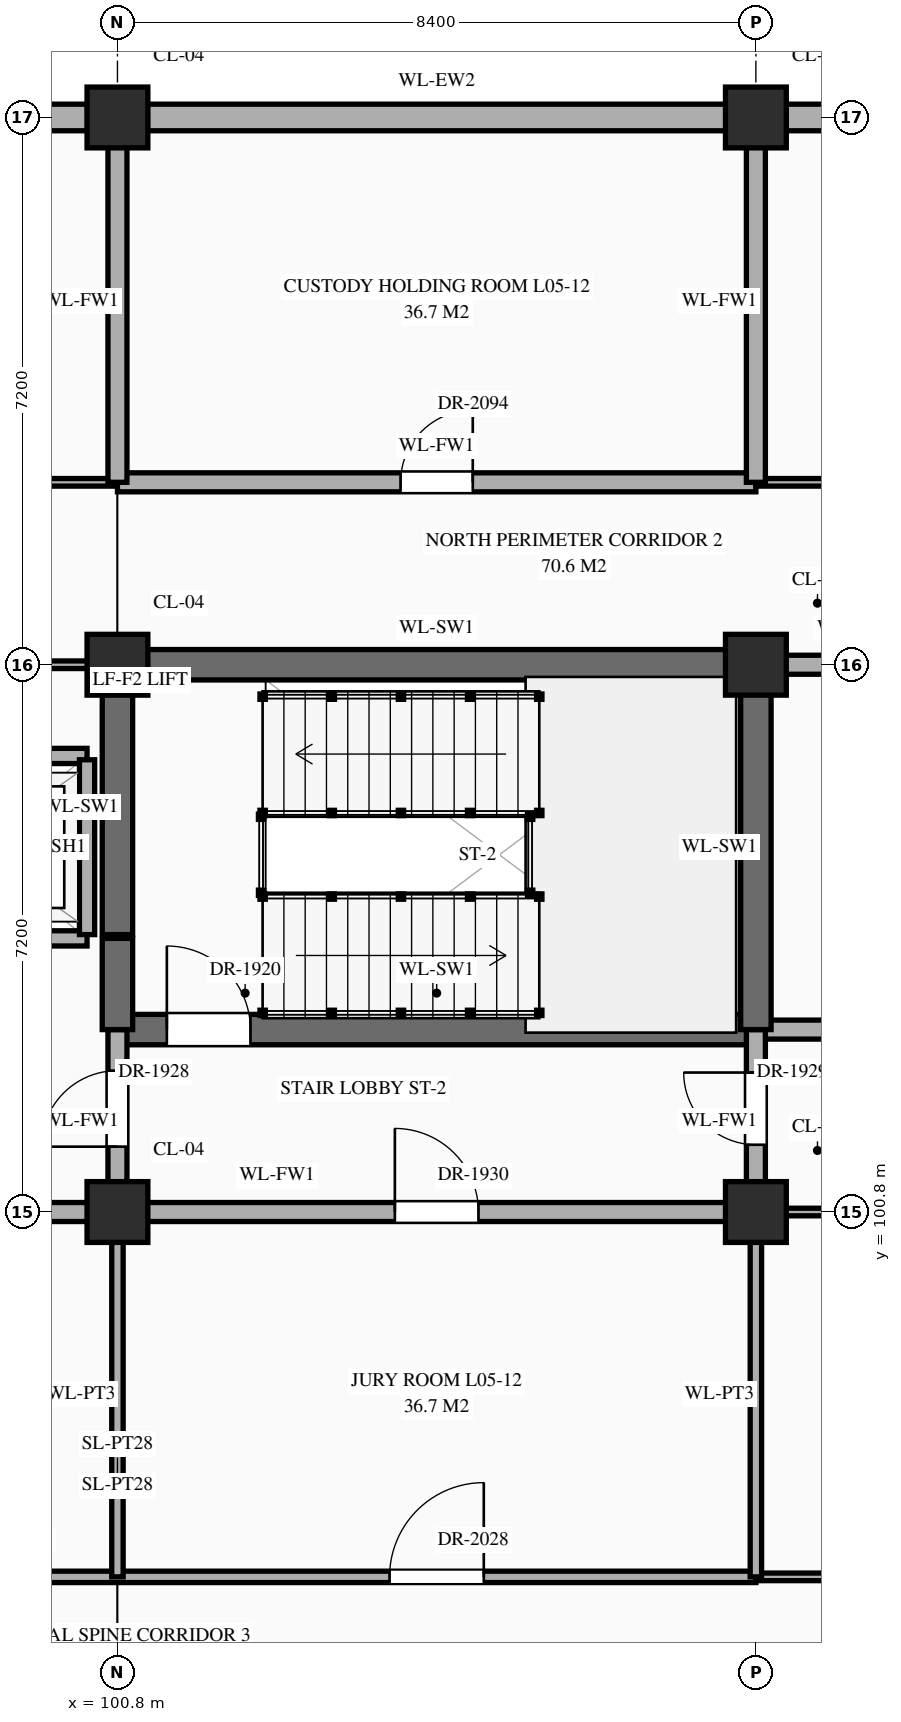
"""IFC4 building model, lengths in metres.
Left out: names, types, materials, properties, quantities, classifications, styles, units other than length and angle.
Written with IfcOpenShell. Run it as: python <this file> out.ifc"""

import sys

from ifc_helpers import new_model, si_unit, direction, frame, frame_2d, origin, origin_2d, place, context, subcontext, project, spatial, rectangle, extrude, element, fill, save


model = new_model("IFC4")
c1 = context("Model", 3, precision=1e-05, world=origin(), true_north=direction((0.0, 1.0)))
c2 = subcontext(c1, "Body", "Model", "MODEL_VIEW")
j1 = project(units=[si_unit("LENGTHUNIT", "METRE"), si_unit("PLANEANGLEUNIT", "RADIAN")], contexts=[c1])
p1 = place(None, origin())
s1 = spatial("IfcSite", under=j1, at=p1, CompositionType="ELEMENT")
p2 = place(p1, origin())
s2 = spatial("IfcBuilding", under=s1, at=p2, CompositionType="ELEMENT")
p3 = place(p2, frame((0.0, 0.0, 21.6)))
s3 = spatial("IfcBuildingStorey", under=s2, at=p3, CompositionType="ELEMENT", Elevation=21.6)
for number, where, z_axis, x_axis in (
    (1, (100.8, 100.8, 0.0), (0.0, 0.0, 1.0), (1.0, 0.0, 0.0)),
    (2, (100.8, 108.0, 0.0), (0.0, 0.0, 1.0), (1.0, 0.0, 0.0)),
    (3, (100.8, 115.2, 0.0), (0.0, 0.0, 1.0), (1.0, 0.0, 0.0)),
    (4, (109.2, 100.8, 0.0), (0.0, 0.0, 1.0), (1.0, 0.0, 0.0)),
    (5, (109.2, 108.0, 0.0), (0.0, 0.0, 1.0), (1.0, 0.0, 0.0)),
    (6, (109.2, 115.2, 0.0), (0.0, 0.0, 1.0), (1.0, 0.0, 0.0)),
):
    element("IfcColumn", number, at=place(p3, frame(where, z_axis=z_axis, x_axis=x_axis)), inside=s3, PredefinedType="COLUMN", context=c2, shape_type="SweptSolid", body=[
        extrude(rectangle(XDim=0.8, YDim=0.8, at=origin_2d()), origin(), (0.0, 0.0, 1.0), 4.5),
    ])
p4 = place(p3, frame((92.795, 115.2, 0.0), z_axis=(0.0, 0.0, 1.0), x_axis=(1.0, 0.0, 0.0)))
e7 = element("IfcWall", 7, at=p4, inside=s3, PredefinedType="STANDARD", context=c2, shape_type="SweptSolid", body=[
    extrude(rectangle(XDim=7.61, YDim=0.35, at=frame_2d((3.805, 0.0))), origin(), (0.0, 0.0, 1.0), 3.59),
])
p5 = place(p4, frame((3.28, 0.0, 0.85)))
e8 = element("IfcOpeningElement", 8, at=p5, cuts=e7, PredefinedType="OPENING", context=c2, shape_type="SweptSolid", body=[
    extrude(rectangle(XDim=1.05, YDim=1.38, at=frame_2d((0.525, 0.69))), frame((0.0, 0.187, 0.0), z_axis=(0.0, -1.0, 0.0), x_axis=(1.0, 0.0, 0.0)), (0.0, 0.0, 1.0), 0.374),
])
p6 = place(p3, frame((101.195, 115.2, 0.0), z_axis=(0.0, 0.0, 1.0), x_axis=(1.0, 0.0, 0.0)))
e9 = element("IfcWall", 9, at=p6, inside=s3, PredefinedType="STANDARD", context=c2, shape_type="SweptSolid", body=[
    extrude(rectangle(XDim=7.61, YDim=0.35, at=frame_2d((3.805, 0.0))), origin(), (0.0, 0.0, 1.0), 3.59),
])
p7 = place(p3, frame((109.595, 115.2, 0.0), z_axis=(0.0, 0.0, 1.0), x_axis=(1.0, 0.0, 0.0)))
e10 = element("IfcWall", 10, at=p7, inside=s3, PredefinedType="STANDARD", context=c2, shape_type="SweptSolid", body=[
    extrude(rectangle(XDim=7.61, YDim=0.35, at=frame_2d((3.805, 0.0))), origin(), (0.0, 0.0, 1.0), 3.59),
])
p8 = place(p7, frame((3.28, 0.0, 0.85)))
e11 = element("IfcOpeningElement", 11, at=p8, cuts=e10, PredefinedType="OPENING", context=c2, shape_type="SweptSolid", body=[
    extrude(rectangle(XDim=1.05, YDim=1.74, at=frame_2d((0.525, 0.87))), frame((0.0, 0.187, 0.0), z_axis=(0.0, -1.0, 0.0), x_axis=(1.0, 0.0, 0.0)), (0.0, 0.0, 1.0), 0.374),
])
p9 = place(p3, frame((89.8, 96.0, 0.0), z_axis=(0.0, 0.0, 1.0), x_axis=(1.0, 0.0, 0.0)))
e12 = element("IfcWall", 12, at=p9, inside=s3, PredefinedType="STANDARD", context=c2, shape_type="SweptSolid", body=[
    extrude(rectangle(XDim=19.4, YDim=0.15, at=frame_2d((9.7, 0.0))), origin(), (0.0, 0.0, 1.0), 4.24),
])
p10 = place(p9, frame((0.72, 0.0, 0.0)))
e13 = element("IfcOpeningElement", 13, at=p10, cuts=e12, PredefinedType="OPENING", context=c2, shape_type="SweptSolid", body=[
    extrude(rectangle(XDim=1.16, YDim=2.3, at=frame_2d((0.58, 1.15))), frame((0.0, 0.087, 0.0), z_axis=(0.0, -1.0, 0.0), x_axis=(1.0, 0.0, 0.0)), (0.0, 0.0, 1.0), 0.174),
])
p11 = place(p9, frame((6.2, 0.0, 0.0)))
e14 = element("IfcOpeningElement", 14, at=p11, cuts=e12, PredefinedType="OPENING", context=c2, shape_type="SweptSolid", body=[
    extrude(rectangle(XDim=1.2, YDim=2.35, at=frame_2d((0.6, 1.175))), frame((0.0, 0.087, 0.0), z_axis=(0.0, -1.0, 0.0), x_axis=(1.0, 0.0, 0.0)), (0.0, 0.0, 1.0), 0.174),
])
p12 = place(p9, frame((14.58, 0.0, 0.0)))
e15 = element("IfcOpeningElement", 15, at=p12, cuts=e12, PredefinedType="OPENING", context=c2, shape_type="SweptSolid", body=[
    extrude(rectangle(XDim=1.24, YDim=2.3, at=frame_2d((0.62, 1.15))), frame((0.0, 0.087, 0.0), z_axis=(0.0, -1.0, 0.0), x_axis=(1.0, 0.0, 0.0)), (0.0, 0.0, 1.0), 0.174),
])
p13 = place(p3, frame((109.2, 96.0, 0.0), z_axis=(0.0, 0.0, 1.0), x_axis=(1.0, 0.0, 0.0)))
e16 = element("IfcWall", 16, at=p13, inside=s3, PredefinedType="STANDARD", context=c2, shape_type="SweptSolid", body=[
    extrude(rectangle(XDim=5.8, YDim=0.1, at=frame_2d((2.9, 0.0))), origin(), (0.0, 0.0, 1.0), 4.24),
])
p14 = place(p13, frame((1.06, 0.0, 0.0)))
e17 = element("IfcOpeningElement", 17, at=p14, cuts=e16, PredefinedType="OPENING", context=c2, shape_type="SweptSolid", body=[
    extrude(rectangle(XDim=1.28, YDim=2.35, at=frame_2d((0.64, 1.175))), frame((0.0, 0.062, 0.0), z_axis=(0.0, -1.0, 0.0), x_axis=(1.0, 0.0, 0.0)), (0.0, 0.0, 1.0), 0.124),
])
p15 = place(p13, frame((4.13, 0.0, 0.0)))
e18 = element("IfcOpeningElement", 18, at=p15, cuts=e16, PredefinedType="OPENING", context=c2, shape_type="SweptSolid", body=[
    extrude(rectangle(XDim=0.94, YDim=2.3, at=frame_2d((0.47, 1.15))), frame((0.0, 0.062, 0.0), z_axis=(0.0, -1.0, 0.0), x_axis=(1.0, 0.0, 0.0)), (0.0, 0.0, 1.0), 0.124),
])
p16 = place(p3, frame((96.6, 100.8, 0.0), z_axis=(0.0, 0.0, 1.0), x_axis=(1.0, 0.0, 0.0)))
e19 = element("IfcWall", 19, at=p16, inside=s3, PredefinedType="STANDARD", context=c2, shape_type="SweptSolid", body=[
    extrude(rectangle(XDim=12.6, YDim=0.25, at=frame_2d((6.3, 0.0))), origin(), (0.0, 0.0, 1.0), 3.39),
])
p17 = place(p16, frame((7.85, 0.0, 0.0)))
e20 = element("IfcOpeningElement", 20, at=p17, cuts=e19, PredefinedType="OPENING", context=c2, shape_type="SweptSolid", body=[
    extrude(rectangle(XDim=1.1, YDim=2.2, at=frame_2d((0.55, 1.1))), frame((0.0, 0.137, 0.0), z_axis=(0.0, -1.0, 0.0), x_axis=(1.0, 0.0, 0.0)), (0.0, 0.0, 1.0), 0.274),
])
p18 = place(p3, frame((109.2, 100.8, 0.0), z_axis=(0.0, 0.0, 1.0), x_axis=(1.0, 0.0, 0.0)))
e21 = element("IfcWall", 21, at=p18, inside=s3, PredefinedType="STANDARD", context=c2, shape_type="SweptSolid", body=[
    extrude(rectangle(XDim=3.4, YDim=0.1, at=frame_2d((1.7, 0.0))), origin(), (0.0, 0.0, 1.0), 3.39),
])
p19 = place(p18, frame((1.33, 0.0, 0.0)))
e22 = element("IfcOpeningElement", 22, at=p19, cuts=e21, PredefinedType="OPENING", context=c2, shape_type="SweptSolid", body=[
    extrude(rectangle(XDim=1.06, YDim=2.4, at=frame_2d((0.53, 1.2))), frame((0.0, 0.062, 0.0), z_axis=(0.0, -1.0, 0.0), x_axis=(1.0, 0.0, 0.0)), (0.0, 0.0, 1.0), 0.124),
])
p20 = place(p3, frame((100.8, 103.2, 0.0), z_axis=(0.0, 0.0, 1.0), x_axis=(1.0, 0.0, 0.0)))
e23 = element("IfcWall", 23, at=p20, inside=s3, PredefinedType="SHEAR", context=c2, shape_type="SweptSolid", body=[
    extrude(rectangle(XDim=8.4, YDim=0.4, at=frame_2d((4.2, 0.0))), origin(), (0.0, 0.0, 1.0), 4.24),
])
p21 = place(p20, frame((0.65, 0.0, 0.0)))
e24 = element("IfcOpeningElement", 24, at=p21, cuts=e23, PredefinedType="OPENING", context=c2, shape_type="SweptSolid", body=[
    extrude(rectangle(XDim=1.1, YDim=2.2, at=frame_2d((0.55, 1.1))), frame((0.0, 0.212, 0.0), z_axis=(0.0, -1.0, 0.0), x_axis=(1.0, 0.0, 0.0)), (0.0, 0.0, 1.0), 0.424),
])
p22 = place(p3, frame((109.2, 103.2, 0.0), z_axis=(0.0, 0.0, 1.0), x_axis=(1.0, 0.0, 0.0)))
e25 = element("IfcWall", 25, at=p22, inside=s3, PredefinedType="STANDARD", context=c2, shape_type="SweptSolid", body=[
    extrude(rectangle(XDim=4.2, YDim=0.25, at=frame_2d((2.1, 0.0))), origin(), (0.0, 0.0, 1.0), 4.24),
])
p23 = place(p22, frame((1.625, 0.0, 0.0)))
e26 = element("IfcOpeningElement", 26, at=p23, cuts=e25, PredefinedType="OPENING", context=c2, shape_type="SweptSolid", body=[
    extrude(rectangle(XDim=0.95, YDim=2.15, at=frame_2d((0.475, 1.075))), frame((0.0, 0.137, 0.0), z_axis=(0.0, -1.0, 0.0), x_axis=(1.0, 0.0, 0.0)), (0.0, 0.0, 1.0), 0.274),
])
p24 = place(p3, frame((97.4, 104.4, 0.0), z_axis=(0.0, 0.0, 1.0), x_axis=(1.0, 0.0, 0.0)))
e27 = element("IfcWall", 27, at=p24, inside=s3, PredefinedType="STANDARD", context=c2, shape_type="SweptSolid", body=[
    extrude(rectangle(XDim=3.0, YDim=0.2, at=frame_2d((1.5, 0.0))), origin(), (0.0, 0.0, 1.0), 4.24),
])
p25 = place(p24, frame((0.9, 0.0, 0.0)))
e28 = element("IfcOpeningElement", 28, at=p25, cuts=e27, PredefinedType="OPENING", context=c2, shape_type="SweptSolid", body=[
    extrude(rectangle(XDim=1.2, YDim=2.15, at=frame_2d((0.6, 1.075))), frame((0.0, 0.112, 0.0), z_axis=(0.0, -1.0, 0.0), x_axis=(1.0, 0.0, 0.0)), (0.0, 0.0, 1.0), 0.224),
])
p26 = place(p3, frame((97.4, 106.8, 0.0), z_axis=(0.0, 0.0, 1.0), x_axis=(1.0, 0.0, 0.0)))
e29 = element("IfcWall", 29, at=p26, inside=s3, PredefinedType="STANDARD", context=c2, shape_type="SweptSolid", body=[
    extrude(rectangle(XDim=3.0, YDim=0.2, at=frame_2d((1.5, 0.0))), origin(), (0.0, 0.0, 1.0), 4.24),
])
p27 = place(p3, frame((96.65, 108.0, 0.0), z_axis=(0.0, 0.0, 1.0), x_axis=(1.0, 0.0, 0.0)))
e30 = element("IfcWall", 30, at=p27, inside=s3, PredefinedType="STANDARD", context=c2, shape_type="SweptSolid", body=[
    extrude(rectangle(XDim=4.1, YDim=0.1, at=frame_2d((2.05, 0.0))), origin(), (0.0, 0.0, 1.0), 3.39),
])
p28 = place(p3, frame((100.8, 108.0, 0.0), z_axis=(0.0, 0.0, 1.0), x_axis=(1.0, 0.0, 0.0)))
e31 = element("IfcWall", 31, at=p28, inside=s3, PredefinedType="SHEAR", context=c2, shape_type="SweptSolid", body=[
    extrude(rectangle(XDim=8.4, YDim=0.4, at=frame_2d((4.2, 0.0))), origin(), (0.0, 0.0, 1.0), 4.24),
])
p29 = place(p3, frame((109.2, 108.0, 0.0), z_axis=(0.0, 0.0, 1.0), x_axis=(1.0, 0.0, 0.0)))
e32 = element("IfcWall", 32, at=p29, inside=s3, PredefinedType="STANDARD", context=c2, shape_type="SweptSolid", body=[
    extrude(rectangle(XDim=4.2, YDim=0.25, at=frame_2d((2.1, 0.0))), origin(), (0.0, 0.0, 1.0), 3.39),
])
p30 = place(p29, frame((1.785, 0.0, 0.0)))
e33 = element("IfcOpeningElement", 33, at=p30, cuts=e32, PredefinedType="OPENING", context=c2, shape_type="SweptSolid", body=[
    extrude(rectangle(XDim=0.95, YDim=2.15, at=frame_2d((0.475, 1.075))), frame((0.0, 0.137, 0.0), z_axis=(0.0, -1.0, 0.0), x_axis=(1.0, 0.0, 0.0)), (0.0, 0.0, 1.0), 0.274),
])
p31 = place(p3, frame((67.2, 110.4, 0.0), z_axis=(0.0, 0.0, 1.0), x_axis=(1.0, 0.0, 0.0)))
e34 = element("IfcWall", 34, at=p31, inside=s3, PredefinedType="STANDARD", context=c2, shape_type="SweptSolid", body=[
    extrude(rectangle(XDim=33.6, YDim=0.1, at=frame_2d((16.8, 0.0))), origin(), (0.0, 0.0, 1.0), 4.24),
])
p32 = place(p31, frame((3.7, 0.0, 0.0)))
e35 = element("IfcOpeningElement", 35, at=p32, cuts=e34, PredefinedType="OPENING", context=c2, shape_type="SweptSolid", body=[
    extrude(rectangle(XDim=1.0, YDim=2.25, at=frame_2d((0.5, 1.125))), frame((0.0, 0.062, 0.0), z_axis=(0.0, -1.0, 0.0), x_axis=(1.0, 0.0, 0.0)), (0.0, 0.0, 1.0), 0.124),
])
p33 = place(p31, frame((12.08, 0.0, 0.0)))
e36 = element("IfcOpeningElement", 36, at=p33, cuts=e34, PredefinedType="OPENING", context=c2, shape_type="SweptSolid", body=[
    extrude(rectangle(XDim=1.04, YDim=2.2, at=frame_2d((0.52, 1.1))), frame((0.0, 0.062, 0.0), z_axis=(0.0, -1.0, 0.0), x_axis=(1.0, 0.0, 0.0)), (0.0, 0.0, 1.0), 0.124),
])
p34 = place(p31, frame((20.46, 0.0, 0.0)))
e37 = element("IfcOpeningElement", 37, at=p34, cuts=e34, PredefinedType="OPENING", context=c2, shape_type="SweptSolid", body=[
    extrude(rectangle(XDim=1.08, YDim=2.25, at=frame_2d((0.54, 1.125))), frame((0.0, 0.062, 0.0), z_axis=(0.0, -1.0, 0.0), x_axis=(1.0, 0.0, 0.0)), (0.0, 0.0, 1.0), 0.124),
])
p35 = place(p31, frame((28.84, 0.0, 0.0)))
e38 = element("IfcOpeningElement", 38, at=p35, cuts=e34, PredefinedType="OPENING", context=c2, shape_type="SweptSolid", body=[
    extrude(rectangle(XDim=1.12, YDim=2.25, at=frame_2d((0.56, 1.125))), frame((0.0, 0.062, 0.0), z_axis=(0.0, -1.0, 0.0), x_axis=(1.0, 0.0, 0.0)), (0.0, 0.0, 1.0), 0.124),
])
p36 = place(p3, frame((100.8, 110.4, 0.0), z_axis=(0.0, 0.0, 1.0), x_axis=(1.0, 0.0, 0.0)))
e39 = element("IfcWall", 39, at=p36, inside=s3, PredefinedType="STANDARD", context=c2, shape_type="SweptSolid", body=[
    extrude(rectangle(XDim=8.4, YDim=0.25, at=frame_2d((4.2, 0.0))), origin(), (0.0, 0.0, 1.0), 4.24),
])
p37 = place(p36, frame((3.725, 0.0, 0.0)))
e40 = element("IfcOpeningElement", 40, at=p37, cuts=e39, PredefinedType="OPENING", context=c2, shape_type="SweptSolid", body=[
    extrude(rectangle(XDim=0.95, YDim=2.15, at=frame_2d((0.475, 1.075))), frame((0.0, 0.137, 0.0), z_axis=(0.0, -1.0, 0.0), x_axis=(1.0, 0.0, 0.0)), (0.0, 0.0, 1.0), 0.274),
])
p38 = place(p3, frame((109.2, 110.4, 0.0), z_axis=(0.0, 0.0, 1.0), x_axis=(1.0, 0.0, 0.0)))
e41 = element("IfcWall", 41, at=p38, inside=s3, PredefinedType="STANDARD", context=c2, shape_type="SweptSolid", body=[
    extrude(rectangle(XDim=8.36, YDim=0.1, at=frame_2d((4.18, 0.0))), origin(), (0.0, 0.0, 1.0), 4.24),
])
p39 = place(p38, frame((3.58, 0.0, 0.0)))
e42 = element("IfcOpeningElement", 42, at=p39, cuts=e41, PredefinedType="OPENING", context=c2, shape_type="SweptSolid", body=[
    extrude(rectangle(XDim=1.2, YDim=2.35, at=frame_2d((0.6, 1.175))), frame((0.0, 0.062, 0.0), z_axis=(0.0, -1.0, 0.0), x_axis=(1.0, 0.0, 0.0)), (0.0, 0.0, 1.0), 0.124),
])
p40 = place(p3, frame((100.4, 104.45, 0.0), z_axis=(0.0, 0.0, 1.0), x_axis=(0.0, 1.0, 0.0)))
e43 = element("IfcWall", 43, at=p40, inside=s3, PredefinedType="STANDARD", context=c2, shape_type="SweptSolid", body=[
    extrude(rectangle(XDim=2.3, YDim=0.2, at=frame_2d((1.15, 0.0))), origin(), (0.0, 0.0, 1.0), 4.24),
])
p41 = place(p3, frame((100.8, 96.0, 0.0), z_axis=(0.0, 0.0, 1.0), x_axis=(0.0, 1.0, 0.0)))
e44 = element("IfcWall", 44, at=p41, inside=s3, PredefinedType="STANDARD", context=c2, shape_type="SweptSolid", body=[
    extrude(rectangle(XDim=4.8, YDim=0.15, at=frame_2d((2.4, 0.0))), origin(), (0.0, 0.0, 1.0), 3.49),
])
p42 = place(p3, frame((100.8, 100.8, 0.0), z_axis=(0.0, 0.0, 1.0), x_axis=(0.0, 1.0, 0.0)))
e45 = element("IfcWall", 45, at=p42, inside=s3, PredefinedType="STANDARD", context=c2, shape_type="SweptSolid", body=[
    extrude(rectangle(XDim=2.4, YDim=0.25, at=frame_2d((1.2, 0.0))), origin(), (0.0, 0.0, 1.0), 3.49),
])
p43 = place(p42, frame((0.86, 0.0, 0.0)))
e46 = element("IfcOpeningElement", 46, at=p43, cuts=e45, PredefinedType="OPENING", context=c2, shape_type="SweptSolid", body=[
    extrude(rectangle(XDim=1.0, YDim=2.2, at=frame_2d((0.5, 1.1))), frame((0.0, 0.137, 0.0), z_axis=(0.0, -1.0, 0.0), x_axis=(1.0, 0.0, 0.0)), (0.0, 0.0, 1.0), 0.274),
])
p44 = place(p3, frame((100.8, 103.2, 0.0), z_axis=(0.0, 0.0, 1.0), x_axis=(0.0, 1.0, 0.0)))
e47 = element("IfcWall", 47, at=p44, inside=s3, PredefinedType="SHEAR", context=c2, shape_type="SweptSolid", body=[
    extrude(rectangle(XDim=1.2, YDim=0.4, at=frame_2d((0.6, 0.0))), origin(), (0.0, 0.0, 1.0), 4.24),
])
p45 = place(p3, frame((100.8, 104.45, 0.0), z_axis=(0.0, 0.0, 1.0), x_axis=(0.0, 1.0, 0.0)))
e48 = element("IfcWall", 48, at=p45, inside=s3, PredefinedType="SHEAR", context=c2, shape_type="SweptSolid", body=[
    extrude(rectangle(XDim=3.5, YDim=0.4, at=frame_2d((1.75, 0.0))), origin(), (0.0, 0.0, 1.0), 4.24),
])
p46 = place(p3, frame((100.8, 110.4, 0.0), z_axis=(0.0, 0.0, 1.0), x_axis=(0.0, 1.0, 0.0)))
e49 = element("IfcWall", 49, at=p46, inside=s3, PredefinedType="STANDARD", context=c2, shape_type="SweptSolid", body=[
    extrude(rectangle(XDim=4.76, YDim=0.25, at=frame_2d((2.38, 0.0))), origin(), (0.0, 0.0, 1.0), 3.49),
])
p47 = place(p3, frame((109.2, 96.0, 0.0), z_axis=(0.0, 0.0, 1.0), x_axis=(0.0, 1.0, 0.0)))
e50 = element("IfcWall", 50, at=p47, inside=s3, PredefinedType="STANDARD", context=c2, shape_type="SweptSolid", body=[
    extrude(rectangle(XDim=4.8, YDim=0.15, at=frame_2d((2.4, 0.0))), origin(), (0.0, 0.0, 1.0), 3.49),
])
p48 = place(p3, frame((109.2, 100.8, 0.0), z_axis=(0.0, 0.0, 1.0), x_axis=(0.0, 1.0, 0.0)))
e51 = element("IfcWall", 51, at=p48, inside=s3, PredefinedType="STANDARD", context=c2, shape_type="SweptSolid", body=[
    extrude(rectangle(XDim=2.4, YDim=0.25, at=frame_2d((1.2, 0.0))), origin(), (0.0, 0.0, 1.0), 3.49),
])
p49 = place(p48, frame((0.885, 0.0, 0.0)))
e52 = element("IfcOpeningElement", 52, at=p49, cuts=e51, PredefinedType="OPENING", context=c2, shape_type="SweptSolid", body=[
    extrude(rectangle(XDim=0.95, YDim=2.15, at=frame_2d((0.475, 1.075))), frame((0.0, 0.137, 0.0), z_axis=(0.0, -1.0, 0.0), x_axis=(1.0, 0.0, 0.0)), (0.0, 0.0, 1.0), 0.274),
])
p50 = place(p3, frame((109.2, 103.2, 0.0), z_axis=(0.0, 0.0, 1.0), x_axis=(0.0, 1.0, 0.0)))
e53 = element("IfcWall", 53, at=p50, inside=s3, PredefinedType="SHEAR", context=c2, shape_type="SweptSolid", body=[
    extrude(rectangle(XDim=4.8, YDim=0.4, at=frame_2d((2.4, 0.0))), origin(), (0.0, 0.0, 1.0), 4.24),
])
p51 = place(p3, frame((109.2, 110.4, 0.0), z_axis=(0.0, 0.0, 1.0), x_axis=(0.0, 1.0, 0.0)))
e54 = element("IfcWall", 54, at=p51, inside=s3, PredefinedType="STANDARD", context=c2, shape_type="SweptSolid", body=[
    extrude(rectangle(XDim=4.76, YDim=0.25, at=frame_2d((2.38, 0.0))), origin(), (0.0, 0.0, 1.0), 3.49),
])
p52 = place(p21, origin())
e55 = element("IfcDoor", 55, at=p52, inside=s3, OperationType="SINGLE_SWING_LEFT", PredefinedType="DOOR", context=c2, shape_type="SweptSolid", body=[
    extrude(rectangle(XDim=1.1, YDim=2.2, at=frame_2d((0.55, 1.1))), frame((0.0, 0.025, 0.0), z_axis=(0.0, -1.0, 0.0), x_axis=(1.0, 0.0, 0.0)), (0.0, 0.0, 1.0), 0.05),
])
fill(e24, e55)
p53 = place(p43, origin())
e56 = element("IfcDoor", 56, at=p53, inside=s3, OperationType="SINGLE_SWING_LEFT", PredefinedType="DOOR", context=c2, shape_type="SweptSolid", body=[
    extrude(rectangle(XDim=1.0, YDim=2.2, at=frame_2d((0.5, 1.1))), frame((0.0, 0.025, 0.0), z_axis=(0.0, -1.0, 0.0), x_axis=(1.0, 0.0, 0.0)), (0.0, 0.0, 1.0), 0.05),
])
fill(e46, e56)
p54 = place(p49, origin())
e57 = element("IfcDoor", 57, at=p54, inside=s3, OperationType="SINGLE_SWING_RIGHT", PredefinedType="DOOR", context=c2, shape_type="SweptSolid", body=[
    extrude(rectangle(XDim=0.95, YDim=2.15, at=frame_2d((0.475, 1.075))), frame((0.0, 0.025, 0.0), z_axis=(0.0, -1.0, 0.0), x_axis=(1.0, 0.0, 0.0)), (0.0, 0.0, 1.0), 0.05),
])
fill(e52, e57)
p55 = place(p17, origin())
e58 = element("IfcDoor", 58, at=p55, inside=s3, OperationType="SINGLE_SWING_LEFT", PredefinedType="DOOR", context=c2, shape_type="SweptSolid", body=[
    extrude(rectangle(XDim=1.1, YDim=2.2, at=frame_2d((0.55, 1.1))), frame((0.0, 0.025, 0.0), z_axis=(0.0, -1.0, 0.0), x_axis=(1.0, 0.0, 0.0)), (0.0, 0.0, 1.0), 0.05),
])
fill(e20, e58)
p56 = place(p12, origin())
e59 = element("IfcDoor", 59, at=p56, inside=s3, OperationType="SINGLE_SWING_RIGHT", PredefinedType="DOOR", context=c2, shape_type="SweptSolid", body=[
    extrude(rectangle(XDim=1.24, YDim=2.3, at=frame_2d((0.62, 1.15))), frame((0.0, 0.025, 0.0), z_axis=(0.0, -1.0, 0.0), x_axis=(1.0, 0.0, 0.0)), (0.0, 0.0, 1.0), 0.05),
])
fill(e15, e59)
p57 = place(p37, origin())
e60 = element("IfcDoor", 60, at=p57, inside=s3, OperationType="SINGLE_SWING_RIGHT", PredefinedType="DOOR", context=c2, shape_type="SweptSolid", body=[
    extrude(rectangle(XDim=0.95, YDim=2.15, at=frame_2d((0.475, 1.075))), frame((0.0, 0.025, 0.0), z_axis=(0.0, -1.0, 0.0), x_axis=(1.0, 0.0, 0.0)), (0.0, 0.0, 1.0), 0.05),
])
fill(e40, e60)
save(model, sys.argv[1])
